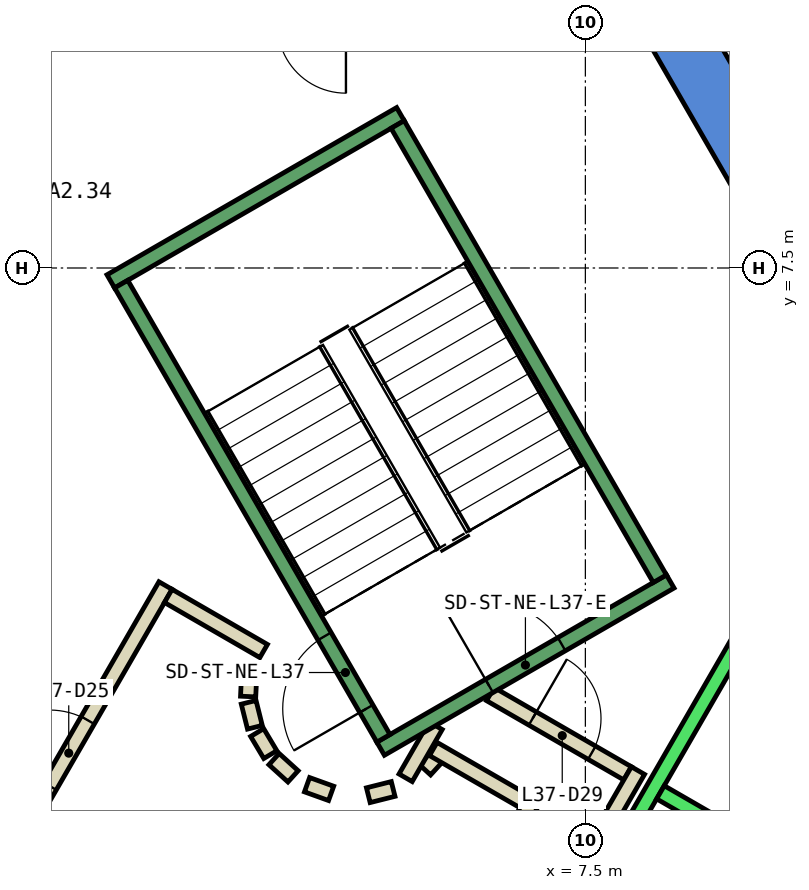
"""IFC4 building model, lengths in metres.
Left out: names, types, materials, properties, quantities, classifications, styles, units other than length and angle.
Written with IfcOpenShell. Run it as: python <this file> out.ifc"""

import sys

from ifc_helpers import new_model, si_unit, direction, frame, frame_2d, origin, place, context, subcontext, project, spatial, polyline, rectangle, outline, extrude, element, fill, save


model = new_model("IFC4")
c1 = context("Model", 3, precision=1e-05, world=origin(), true_north=direction((0.0, 1.0)))
c2 = subcontext(c1, "Body", "Model", "MODEL_VIEW")
j1 = project(units=[si_unit("LENGTHUNIT", "METRE"), si_unit("PLANEANGLEUNIT", "RADIAN")], contexts=[c1])
p1 = place(None, origin())
s1 = spatial("IfcSite", under=j1, at=p1, CompositionType="ELEMENT")
p2 = place(p1, origin())
s2 = spatial("IfcBuilding", under=s1, at=p2, CompositionType="ELEMENT")
p3 = place(p2, frame((0.0, 0.0, 167.6)))
s3 = spatial("IfcBuildingStorey", under=s2, at=p3, CompositionType="ELEMENT", Elevation=167.6)
p4 = place(p3, frame((0.0, 0.0, -0.4)))
e1 = element("IfcWall", 1, at=p4, inside=s3, PredefinedType="SHEAR", context=c2, shape_type="SweptSolid", body=[
    extrude(outline(polyline([(8.517, 11.748), (7.824, 11.348), (12.933, 2.5), (13.856, 2.5), (8.517, 11.748)])), origin(), (0.0, 0.0, 1.0), 4.2),
])
p5 = place(p3, frame((5.39, 0.898, 0.0), z_axis=(0.0, 0.0, 1.0), x_axis=(0.673828488714, 0.738887791073, 0.0)))
e2 = element("IfcWall", 2, at=p5, inside=s3, PredefinedType="PARTITIONING", context=c2, shape_type="SweptSolid", body=[
    extrude(rectangle(XDim=0.263, YDim=0.2, at=frame_2d((0.131, 0.0))), origin(), (0.0, 0.0, 1.0), 3.8),
])
p6 = place(p3, frame((5.499, 1.172, 0.0), z_axis=(0.0, 0.0, 1.0), x_axis=(0.866333505267, -0.499465972466, 0.0)))
e3 = element("IfcWall", 3, at=p6, inside=s3, PredefinedType="PARTITIONING", context=c2, shape_type="SweptSolid", body=[
    extrude(rectangle(XDim=1.374, YDim=0.2, at=frame_2d((0.687, 0.0))), origin(), (0.0, 0.0, 1.0), 3.8),
])
p7 = place(p3, frame((6.826, 0.522, 0.0), z_axis=(0.0, 0.0, 1.0), x_axis=(-0.500016722714, -0.866015748706, 0.0)))
e4 = element("IfcWall", 4, at=p7, inside=s3, PredefinedType="PARTITIONING", context=c2, shape_type="SweptSolid", body=[
    extrude(rectangle(XDim=1.7, YDim=0.2, at=frame_2d((0.85, 0.0))), origin(), (0.0, 0.0, 1.0), 3.8),
])
p8 = place(p3, frame((6.25, 1.894, 0.0), z_axis=(0.0, 0.0, 1.0), x_axis=(0.866043184279, -0.499969202016, 0.0)))
e5 = element("IfcWall", 5, at=p8, inside=s3, PredefinedType="PARTITIONING", context=c2, shape_type="SweptSolid", body=[
    extrude(rectangle(XDim=2.084, YDim=0.2, at=frame_2d((1.042, 0.0))), origin(), (0.0, 0.0, 1.0), 3.8),
])
p9 = place(p8, frame((0.642, 0.0, 0.0)))
e6 = element("IfcOpeningElement", 6, at=p9, cuts=e5, PredefinedType="OPENING", context=c2, shape_type="SweptSolid", body=[
    extrude(rectangle(XDim=0.9, YDim=2.1, at=frame_2d((0.45, 1.05))), frame((0.0, 0.11, 0.0), z_axis=(0.0, -1.0, 0.0), x_axis=(1.0, 0.0, 0.0)), (0.0, 0.0, 1.0), 0.22),
])
p10 = place(p3, frame((8.192, 0.888, 0.0), z_axis=(0.0, 0.0, 1.0), x_axis=(-0.499940625693, -0.866059680843, 0.0)))
e7 = element("IfcWall", 7, at=p10, inside=s3, PredefinedType="PARTITIONING", context=c2, shape_type="SweptSolid", body=[
    extrude(rectangle(XDim=2.68, YDim=0.2, at=frame_2d((1.34, 0.0))), origin(), (0.0, 0.0, 1.0), 3.8),
])
p11 = place(p3, frame((5.135, 0.793, 0.0), z_axis=(0.0, 0.0, 1.0), x_axis=(0.499526442893, 0.866298639529, 0.0)))
e8 = element("IfcWall", 8, at=p11, inside=s3, PredefinedType="PARTITIONING", context=c2, shape_type="SweptSolid", body=[
    extrude(rectangle(XDim=0.791, YDim=0.2, at=frame_2d((0.396, 0.0))), origin(), (0.0, 0.0, 1.0), 3.8),
])
p12 = place(p3, frame((-0.52, -1.0, 0.0), z_axis=(0.0, 0.0, 1.0), x_axis=(0.50011622646, 0.865958290007, 0.0)))
e9 = element("IfcWall", 9, at=p12, inside=s3, PredefinedType="PARTITIONING", context=c2, shape_type="SweptSolid", body=[
    extrude(rectangle(XDim=4.991, YDim=0.2, at=frame_2d((2.496, 0.0))), origin(), (0.0, 0.0, 1.0), 3.8),
])
p13 = place(p12, frame((1.945, 0.0, 0.0)))
e10 = element("IfcOpeningElement", 10, at=p13, cuts=e9, PredefinedType="OPENING", context=c2, shape_type="SweptSolid", body=[
    extrude(rectangle(XDim=1.0, YDim=2.1, at=frame_2d((0.5, 1.05))), frame((0.0, 0.11, 0.0), z_axis=(0.0, -1.0, 0.0), x_axis=(1.0, 0.0, 0.0)), (0.0, 0.0, 1.0), 0.22),
])
p14 = place(p3, frame((2.012, 3.186, 0.0), z_axis=(0.0, 0.0, 1.0), x_axis=(0.865891012941, -0.500232699559, 0.0)))
e11 = element("IfcWall", 11, at=p14, inside=s3, PredefinedType="PARTITIONING", context=c2, shape_type="SweptSolid", body=[
    extrude(rectangle(XDim=1.449, YDim=0.2, at=frame_2d((0.725, 0.0))), origin(), (0.0, 0.0, 1.0), 3.8),
])
p15 = place(p3, frame((3.079, 2.199, 0.0), z_axis=(0.0, 0.0, 1.0), x_axis=(-0.047771483479, -0.998858290933, 0.0)))
e12 = element("IfcWall", 12, at=p15, inside=s3, PredefinedType="PARTITIONING", context=c2, shape_type="SweptSolid", body=[
    extrude(rectangle(XDim=0.337, YDim=0.2, at=frame_2d((0.169, 0.0))), origin(), (0.0, 0.0, 1.0), 3.8),
])
p16 = place(p3, frame((3.07, 1.786, 0.0), z_axis=(0.0, 0.0, 1.0), x_axis=(0.242705583207, -0.970099994784, 0.0)))
e13 = element("IfcWall", 13, at=p16, inside=s3, PredefinedType="PARTITIONING", context=c2, shape_type="SweptSolid", body=[
    extrude(rectangle(XDim=0.338, YDim=0.2, at=frame_2d((0.169, 0.0))), origin(), (0.0, 0.0, 1.0), 3.8),
])
for number, where, z_axis, x_axis in (
    (14, (3.182, 1.388, 0.0), (0.0, 0.0, 1.0), (0.512, -0.859, 0.0)),
    (15, (3.404, 1.039, 0.0), (0.0, 0.0, 1.0), (0.74, -0.672, 0.0)),
):
    element("IfcWall", number, at=place(p3, frame(where, z_axis=z_axis, x_axis=x_axis)), inside=s3, PredefinedType="PARTITIONING", context=c2, shape_type="SweptSolid", body=[
        extrude(rectangle(XDim=0.338, YDim=0.2, at=frame_2d((0.169, 0.0))), origin(), (0.0, 0.0, 1.0), 3.8),
    ])
p17 = place(p3, frame((3.838, 0.702, 0.0), z_axis=(0.0, 0.0, 1.0), x_axis=(0.941035081519, -0.338308993895, 0.0)))
e16 = element("IfcWall", 16, at=p17, inside=s3, PredefinedType="PARTITIONING", context=c2, shape_type="SweptSolid", body=[
    extrude(rectangle(XDim=0.337, YDim=0.2, at=frame_2d((0.168, 0.0))), origin(), (0.0, 0.0, 1.0), 3.8),
])
p18 = place(p3, frame((4.644, 0.564, 0.0), z_axis=(0.0, 0.0, 1.0), x_axis=(0.969929076366, 0.243387729394, 0.0)))
e17 = element("IfcWall", 17, at=p18, inside=s3, PredefinedType="PARTITIONING", context=c2, shape_type="SweptSolid", body=[
    extrude(rectangle(XDim=0.337, YDim=0.2, at=frame_2d((0.168, 0.0))), origin(), (0.0, 0.0, 1.0), 3.8),
])
p19 = place(p3, frame((4.451, -6.19, 0.0), z_axis=(0.0, 0.0, 1.0), x_axis=(0.50000090737, 0.866024879913, 0.0)))
e18 = element("IfcWall", 18, at=p19, inside=s3, PredefinedType="STANDARD", context=c2, shape_type="SweptSolid", body=[
    extrude(rectangle(XDim=10.6, YDim=0.2, at=frame_2d((5.3, 0.0))), origin(), (0.0, 0.0, 1.0), 3.8),
])
p20 = place(p3, frame((8.488, 0.602, 0.0), z_axis=(0.0, 0.0, 1.0), x_axis=(0.866022959057, -0.500004234368, 0.0)))
e19 = element("IfcWall", 19, at=p20, inside=s3, PredefinedType="STANDARD", context=c2, shape_type="SweptSolid", body=[
    extrude(rectangle(XDim=2.5, YDim=0.2, at=frame_2d((1.25, 0.0))), origin(), (0.0, 0.0, 1.0), 3.8),
])
p21 = place(p3, frame((4.806, 1.176, 0.0), z_axis=(0.0, 0.0, 1.0), x_axis=(0.866059941101, 0.499940174841, 0.0)))
e20 = element("IfcWall", 20, at=p21, inside=s3, PredefinedType="STANDARD", context=c2, shape_type="SweptSolid", body=[
    extrude(rectangle(XDim=4.4, YDim=0.2, at=frame_2d((2.2, 0.0))), origin(), (0.0, 0.0, 1.0), 3.8),
])
p22 = place(p21, frame((1.65, 0.0, 0.0)))
e21 = element("IfcOpeningElement", 21, at=p22, cuts=e20, PredefinedType="OPENING", context=c2, shape_type="SweptSolid", body=[
    extrude(rectangle(XDim=1.1, YDim=2.2, at=frame_2d((0.55, 1.1))), frame((0.0, 0.11, 0.0), z_axis=(0.0, -1.0, 0.0), x_axis=(1.0, 0.0, 0.0)), (0.0, 0.0, 1.0), 0.22),
])
p23 = place(p3, frame((1.256, 7.324, 0.0), z_axis=(0.0, 0.0, 1.0), x_axis=(0.866046073146, 0.499964197906, 0.0)))
e22 = element("IfcWall", 22, at=p23, inside=s3, PredefinedType="STANDARD", context=c2, shape_type="SweptSolid", body=[
    extrude(rectangle(XDim=4.4, YDim=0.2, at=frame_2d((2.2, 0.0))), origin(), (0.0, 0.0, 1.0), 3.8),
])
p24 = place(p3, frame((4.843, 1.312, 0.0), z_axis=(0.0, 0.0, 1.0), x_axis=(-0.499963383562, 0.866046543262, 0.0)))
e23 = element("IfcWall", 23, at=p24, inside=s3, PredefinedType="STANDARD", context=c2, shape_type="SweptSolid", body=[
    extrude(rectangle(XDim=6.9, YDim=0.2, at=frame_2d((3.45, 0.0))), origin(), (0.0, 0.0, 1.0), 3.8),
])
p25 = place(p24, frame((0.45, 0.0, 0.0)))
e24 = element("IfcOpeningElement", 24, at=p25, cuts=e23, PredefinedType="OPENING", context=c2, shape_type="SweptSolid", body=[
    extrude(rectangle(XDim=1.1, YDim=2.2, at=frame_2d((0.55, 1.1))), frame((0.0, 0.11, 0.0), z_axis=(0.0, -1.0, 0.0), x_axis=(1.0, 0.0, 0.0)), (0.0, 0.0, 1.0), 0.22),
])
p26 = place(p3, frame((8.48, 3.412, 0.0), z_axis=(0.0, 0.0, 1.0), x_axis=(-0.499978703459, 0.866037698999, 0.0)))
e25 = element("IfcWall", 25, at=p26, inside=s3, PredefinedType="STANDARD", context=c2, shape_type="SweptSolid", body=[
    extrude(rectangle(XDim=6.9, YDim=0.2, at=frame_2d((3.45, 0.0))), origin(), (0.0, 0.0, 1.0), 3.8),
])
p27 = place(p13, origin())
e26 = element("IfcDoor", 26, at=p27, inside=s3, OperationType="SINGLE_SWING_LEFT", PredefinedType="DOOR", context=c2, shape_type="SweptSolid", body=[
    extrude(rectangle(XDim=1.0, YDim=2.1, at=frame_2d((0.5, 1.05))), frame((0.0, 0.025, 0.0), z_axis=(0.0, -1.0, 0.0), x_axis=(1.0, 0.0, 0.0)), (0.0, 0.0, 1.0), 0.05),
])
fill(e10, e26)
p28 = place(p9, origin())
e27 = element("IfcDoor", 27, at=p28, inside=s3, OperationType="SINGLE_SWING_LEFT", PredefinedType="DOOR", context=c2, shape_type="SweptSolid", body=[
    extrude(rectangle(XDim=0.9, YDim=2.1, at=frame_2d((0.45, 1.05))), frame((0.0, 0.025, 0.0), z_axis=(0.0, -1.0, 0.0), x_axis=(1.0, 0.0, 0.0)), (0.0, 0.0, 1.0), 0.05),
])
fill(e6, e27)
p29 = place(p25, origin())
e28 = element("IfcDoor", 28, at=p29, inside=s3, OperationType="SINGLE_SWING_LEFT", PredefinedType="DOOR", context=c2, shape_type="SweptSolid", body=[
    extrude(rectangle(XDim=1.1, YDim=2.2, at=frame_2d((0.55, 1.1))), frame((0.0, 0.025, 0.0), z_axis=(0.0, -1.0, 0.0), x_axis=(1.0, 0.0, 0.0)), (0.0, 0.0, 1.0), 0.05),
])
fill(e24, e28)
p30 = place(p22, origin())
e29 = element("IfcDoor", 29, at=p30, inside=s3, OperationType="SINGLE_SWING_LEFT", PredefinedType="DOOR", context=c2, shape_type="SweptSolid", body=[
    extrude(rectangle(XDim=1.1, YDim=2.2, at=frame_2d((0.55, 1.1))), frame((0.0, 0.025, 0.0), z_axis=(0.0, -1.0, 0.0), x_axis=(1.0, 0.0, 0.0)), (0.0, 0.0, 1.0), 0.05),
])
fill(e21, e29)
save(model, sys.argv[1])
